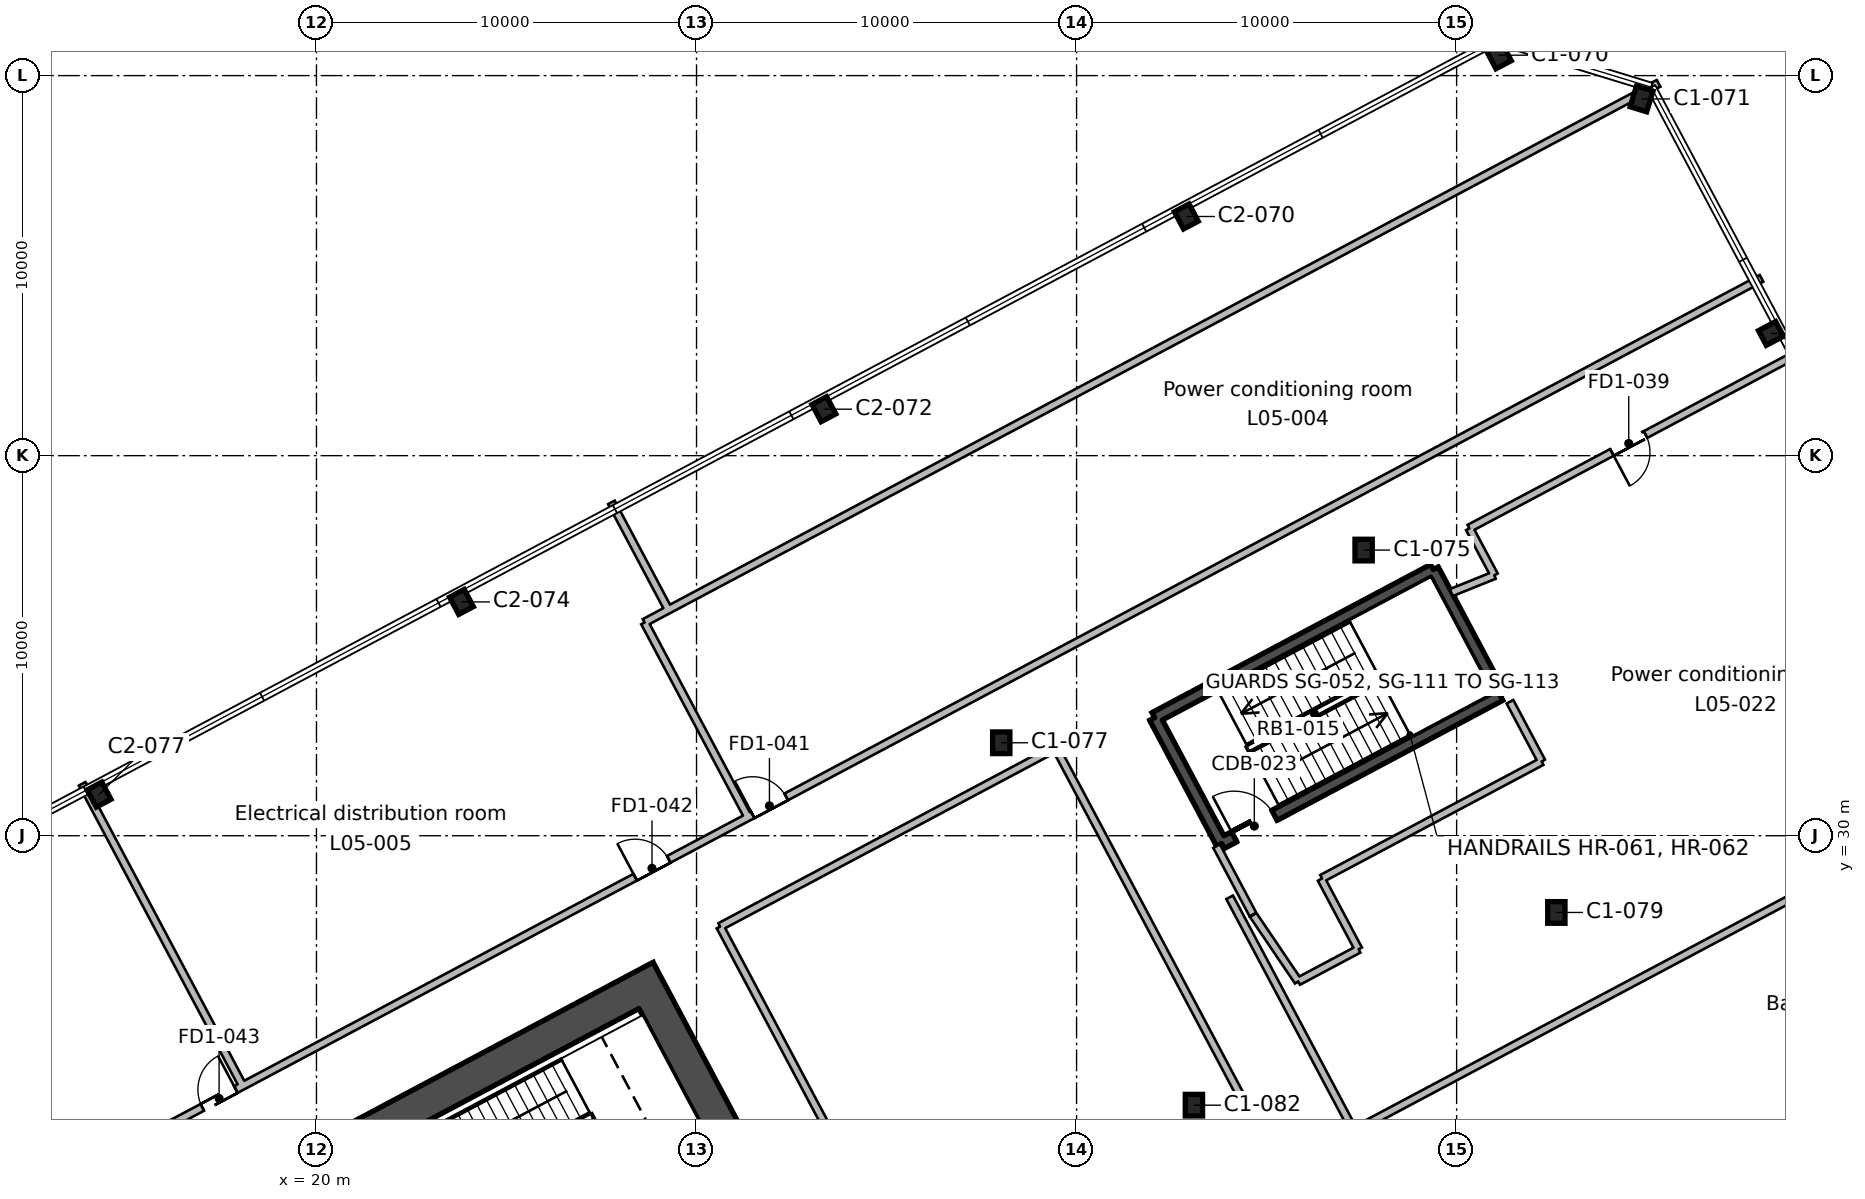
"""IFC4 building model, lengths in metres.
Left out: names, types, materials, properties, quantities, classifications, styles, units other than length and angle.
Written with IfcOpenShell. Run it as: python <this file> out.ifc"""

import sys

from ifc_helpers import new_model, si_unit, direction, frame, frame_2d, origin, origin_2d, place, context, subcontext, project, spatial, rectangle, i_section, extrude, element, fill, save


model = new_model("IFC4")
c1 = context("Model", 3, precision=1e-05, world=origin(), true_north=direction((0.0, 1.0)))
c2 = subcontext(c1, "Body", "Model", "MODEL_VIEW")
j1 = project(units=[si_unit("LENGTHUNIT", "METRE"), si_unit("PLANEANGLEUNIT", "RADIAN")], contexts=[c1])
p1 = place(None, origin())
s1 = spatial("IfcSite", under=j1, at=p1, CompositionType="ELEMENT")
p2 = place(p1, origin())
s2 = spatial("IfcBuilding", under=s1, at=p2, CompositionType="ELEMENT")
p3 = place(p2, frame((0.0, 0.0, 28.4)))
s3 = spatial("IfcBuildingStorey", under=s2, at=p3, CompositionType="ELEMENT", Elevation=28.4)
for number, where, z_axis, x_axis in (
    (1, (43.088, 22.91, 0.0), (0.0, 0.0, 1.0), (1.0, 0.0, 0.0)),
    (2, (52.624, 27.981, 0.0), (0.0, 0.0, 1.0), (1.0, 0.0, 0.0)),
):
    element("IfcColumn", number, at=place(p3, frame(where, z_axis=z_axis, x_axis=x_axis)), inside=s3, PredefinedType="COLUMN", context=c2, shape_type="SweptSolid", body=[
        extrude(i_section(OverallWidth=0.455, OverallDepth=0.569, WebThickness=0.078, FlangeThickness=0.125, FilletRadius=0.015, at=origin_2d()), origin(), (0.0, 0.0, 1.0), 5.4),
    ])
p4 = place(p3, frame((14.279, 31.082, 0.0), z_axis=(0.0, 0.0, 1.0), x_axis=(-0.882947592859, -0.469471562786, 0.0)))
e3 = element("IfcColumn", 3, at=p4, inside=s3, PredefinedType="COLUMN", context=c2, shape_type="SweptSolid", body=[
    extrude(i_section(OverallWidth=0.437, OverallDepth=0.513, WebThickness=0.061, FlangeThickness=0.097, FilletRadius=0.015, at=origin_2d()), origin(), (0.0, 0.0, 1.0), 5.4),
])
p5 = place(p3, frame((38.018, 32.446, 0.0), z_axis=(0.0, 0.0, 1.0), x_axis=(1.0, 0.0, 0.0)))
e4 = element("IfcColumn", 4, at=p5, inside=s3, PredefinedType="COLUMN", context=c2, shape_type="SweptSolid", body=[
    extrude(i_section(OverallWidth=0.455, OverallDepth=0.569, WebThickness=0.078, FlangeThickness=0.125, FilletRadius=0.015, at=origin_2d()), origin(), (0.0, 0.0, 1.0), 5.4),
])
p6 = place(p3, frame((23.815, 36.152, 0.0), z_axis=(0.0, 0.0, 1.0), x_axis=(-0.882947592859, -0.469471562786, 0.0)))
e5 = element("IfcColumn", 5, at=p6, inside=s3, PredefinedType="COLUMN", context=c2, shape_type="SweptSolid", body=[
    extrude(i_section(OverallWidth=0.437, OverallDepth=0.513, WebThickness=0.061, FlangeThickness=0.097, FilletRadius=0.015, at=origin_2d()), origin(), (0.0, 0.0, 1.0), 5.4),
])
p7 = place(p3, frame((47.553, 37.516, 0.0), z_axis=(0.0, 0.0, 1.0), x_axis=(1.0, 0.0, 0.0)))
e6 = element("IfcColumn", 6, at=p7, inside=s3, PredefinedType="COLUMN", context=c2, shape_type="SweptSolid", body=[
    extrude(i_section(OverallWidth=0.455, OverallDepth=0.569, WebThickness=0.078, FlangeThickness=0.125, FilletRadius=0.015, at=origin_2d()), origin(), (0.0, 0.0, 1.0), 5.4),
])
for number, where, z_axis, x_axis in (
    (7, (33.351, 41.223, 0.0), (0.0, 0.0, 1.0), (-0.883, -0.469, 0.0)),
    (8, (58.272, 43.216, 0.0), (0.0, 0.0, 1.0), (-0.469, 0.883, 0.0)),
    (9, (42.887, 46.293, 0.0), (0.0, 0.0, 1.0), (-0.883, -0.469, 0.0)),
):
    element("IfcColumn", number, at=place(p3, frame(where, z_axis=z_axis, x_axis=x_axis)), inside=s3, PredefinedType="COLUMN", context=c2, shape_type="SweptSolid", body=[
        extrude(i_section(OverallWidth=0.437, OverallDepth=0.513, WebThickness=0.061, FlangeThickness=0.097, FilletRadius=0.015, at=origin_2d()), origin(), (0.0, 0.0, 1.0), 5.4),
    ])
for number, where, z_axis, x_axis in (
    (10, (54.867, 49.386, 0.0), (0.0, 0.0, 1.0), (-0.956, 0.292, 0.0)),
    (11, (51.103, 50.537, 0.0), (0.0, 0.0, 1.0), (-0.883, -0.469, 0.0)),
):
    element("IfcColumn", number, at=place(p3, frame(where, z_axis=z_axis, x_axis=x_axis)), inside=s3, PredefinedType="COLUMN", context=c2, shape_type="SweptSolid", body=[
        extrude(i_section(OverallWidth=0.455, OverallDepth=0.569, WebThickness=0.078, FlangeThickness=0.125, FilletRadius=0.015, at=origin_2d()), origin(), (0.0, 0.0, 1.0), 5.4),
    ])
p8 = place(p3, frame((37.849, 8.799, 0.0), z_axis=(0.0, 0.0, 1.0), x_axis=(-0.469465789982, 0.882950662289, 0.0)))
e12 = element("IfcWall", 12, at=p8, inside=s3, PredefinedType="SHEAR", context=c2, shape_type="SweptSolid", body=[
    extrude(rectangle(XDim=20.0, YDim=0.9, at=frame_2d((10.0, 0.0))), origin(), (0.0, 0.0, 1.0), 5.4),
])
p9 = place(p8, frame((10.6, 0.0, 0.0)))
e13 = element("IfcOpeningElement", 13, at=p9, cuts=e12, PredefinedType="OPENING", context=c2, shape_type="SweptSolid", body=[
    extrude(rectangle(XDim=2.4, YDim=2.4, at=frame_2d((1.2, 1.2))), frame((0.0, 0.46, 0.0), z_axis=(0.0, -1.0, 0.0), x_axis=(1.0, 0.0, 0.0)), (0.0, 0.0, 1.0), 0.92),
])
p10 = place(p3, frame((10.438, 16.366, 0.0), z_axis=(0.0, 0.0, 1.0), x_axis=(0.88294509198, 0.469476266226, 0.0)))
e14 = element("IfcWall", 14, at=p10, inside=s3, PredefinedType="SHEAR", context=c2, shape_type="SweptSolid", body=[
    extrude(rectangle(XDim=20.2, YDim=0.9, at=frame_2d((10.1, 0.0))), origin(), (0.0, 0.0, 1.0), 5.4),
])
p11 = place(p3, frame((49.384, 37.004, 0.0), z_axis=(0.0, 0.0, 1.0), x_axis=(0.46946936446, -0.882948761726, 0.0)))
e15 = element("IfcWall", 15, at=p11, inside=s3, PredefinedType="SHEAR", context=c2, shape_type="SweptSolid", body=[
    extrude(rectangle(XDim=3.75, YDim=0.3, at=frame_2d((1.875, 0.0))), origin(), (0.0, 0.0, 1.0), 5.4),
])
p12 = place(p3, frame((51.145, 33.693, 0.0), z_axis=(0.0, 0.0, 1.0), x_axis=(-0.882945809314, -0.469474917132, 0.0)))
e16 = element("IfcWall", 16, at=p12, inside=s3, PredefinedType="SHEAR", context=c2, shape_type="SweptSolid", body=[
    extrude(rectangle(XDim=8.3, YDim=0.3, at=frame_2d((4.15, 0.0))), origin(), (0.0, 0.0, 1.0), 5.4),
])
p13 = place(p12, frame((6.725, 0.0, 0.0)))
e17 = element("IfcOpeningElement", 17, at=p13, cuts=e16, PredefinedType="OPENING", context=c2, shape_type="SweptSolid", body=[
    extrude(rectangle(XDim=1.2, YDim=2.1, at=frame_2d((0.6, 1.05))), frame((0.0, 0.16, 0.0), z_axis=(0.0, -1.0, 0.0), x_axis=(1.0, 0.0, 0.0)), (0.0, 0.0, 1.0), 0.32),
])
p14 = place(p3, frame((43.816, 29.796, 0.0), z_axis=(0.0, 0.0, 1.0), x_axis=(-0.46946936446, 0.882948761726, 0.0)))
e18 = element("IfcWall", 18, at=p14, inside=s3, PredefinedType="SHEAR", context=c2, shape_type="SweptSolid", body=[
    extrude(rectangle(XDim=3.75, YDim=0.3, at=frame_2d((1.875, 0.0))), origin(), (0.0, 0.0, 1.0), 5.4),
])
p15 = place(p3, frame((42.055, 33.107, 0.0), z_axis=(0.0, 0.0, 1.0), x_axis=(0.882945809314, 0.469474917132, 0.0)))
e19 = element("IfcWall", 19, at=p15, inside=s3, PredefinedType="SHEAR", context=c2, shape_type="SweptSolid", body=[
    extrude(rectangle(XDim=8.3, YDim=0.3, at=frame_2d((4.15, 0.0))), origin(), (0.0, 0.0, 1.0), 5.4),
])
p16 = place(p3, frame((0.0, 13.815, 0.0), z_axis=(0.0, 0.0, 1.0), x_axis=(0.882946053005, 0.469474458819, 0.0)))
e20 = element("IfcWall", 20, at=p16, inside=s3, PredefinedType="PARTITIONING", context=c2, shape_type="SweptSolid", body=[
    extrude(rectangle(XDim=65.714, YDim=0.2, at=frame_2d((32.857, 0.0))), origin(), (0.0, 0.0, 1.0), 4.95),
])
p17 = place(p16, frame((35.65, 0.0, 0.0)))
e21 = element("IfcOpeningElement", 21, at=p17, cuts=e20, PredefinedType="OPENING", context=c2, shape_type="SweptSolid", body=[
    extrude(rectangle(XDim=1.0, YDim=2.1, at=frame_2d((0.5, 1.05))), frame((0.0, 0.11, 0.0), z_axis=(0.0, -1.0, 0.0), x_axis=(1.0, 0.0, 0.0)), (0.0, 0.0, 1.0), 0.22),
])
p18 = place(p16, frame((32.15, 0.0, 0.0)))
e22 = element("IfcOpeningElement", 22, at=p18, cuts=e20, PredefinedType="OPENING", context=c2, shape_type="SweptSolid", body=[
    extrude(rectangle(XDim=1.0, YDim=2.1, at=frame_2d((0.5, 1.05))), frame((0.0, 0.11, 0.0), z_axis=(0.0, -1.0, 0.0), x_axis=(1.0, 0.0, 0.0)), (0.0, 0.0, 1.0), 0.22),
])
p19 = place(p16, frame((19.25, 0.0, 0.0)))
e23 = element("IfcOpeningElement", 23, at=p19, cuts=e20, PredefinedType="OPENING", context=c2, shape_type="SweptSolid", body=[
    extrude(rectangle(XDim=1.0, YDim=2.1, at=frame_2d((0.5, 1.05))), frame((0.0, 0.11, 0.0), z_axis=(0.0, -1.0, 0.0), x_axis=(1.0, 0.0, 0.0)), (0.0, 0.0, 1.0), 0.22),
])
p20 = place(p3, frame((13.834, 31.366, 0.0), z_axis=(0.0, 0.0, 1.0), x_axis=(0.46934623538, -0.883014219214, 0.0)))
e24 = element("IfcWall", 24, at=p20, inside=s3, PredefinedType="PARTITIONING", context=c2, shape_type="SweptSolid", body=[
    extrude(rectangle(XDim=9.002, YDim=0.2, at=frame_2d((4.501, 0.0))), origin(), (0.0, 0.0, 1.0), 4.95),
])
p21 = place(p3, frame((69.475, 23.126, 0.0), z_axis=(0.0, 0.0, 1.0), x_axis=(-0.882944287046, -0.469477780063, 0.0)))
e25 = element("IfcWall", 25, at=p21, inside=s3, PredefinedType="PARTITIONING", context=c2, shape_type="SweptSolid", body=[
    extrude(rectangle(XDim=63.285, YDim=0.2, at=frame_2d((31.643, 0.0))), origin(), (0.0, 0.0, 1.0), 4.95),
])
p22 = place(p21, frame((47.47, 0.0, 0.0)))
e26 = element("IfcOpeningElement", 26, at=p22, cuts=e25, PredefinedType="OPENING", context=c2, shape_type="SweptSolid", body=[
    extrude(rectangle(XDim=1.0, YDim=2.1, at=frame_2d((0.5, 1.05))), frame((0.0, 0.11, 0.0), z_axis=(0.0, -1.0, 0.0), x_axis=(1.0, 0.0, 0.0)), (0.0, 0.0, 1.0), 0.22),
])
p23 = place(p21, frame((31.271, 0.0, 0.0)))
e27 = element("IfcOpeningElement", 27, at=p23, cuts=e25, PredefinedType="OPENING", context=c2, shape_type="SweptSolid", body=[
    extrude(rectangle(XDim=1.0, YDim=2.1, at=frame_2d((0.5, 1.05))), frame((0.0, 0.11, 0.0), z_axis=(0.0, -1.0, 0.0), x_axis=(1.0, 0.0, 0.0)), (0.0, 0.0, 1.0), 0.22),
])
p24 = place(p21, frame((24.07, 0.0, 0.0)))
e28 = element("IfcOpeningElement", 28, at=p24, cuts=e25, PredefinedType="OPENING", context=c2, shape_type="SweptSolid", body=[
    extrude(rectangle(XDim=1.0, YDim=2.1, at=frame_2d((0.5, 1.05))), frame((0.0, 0.11, 0.0), z_axis=(0.0, -1.0, 0.0), x_axis=(1.0, 0.0, 0.0)), (0.0, 0.0, 1.0), 0.22),
])
p25 = place(p21, frame((11.071, 0.0, 0.0)))
e29 = element("IfcOpeningElement", 29, at=p25, cuts=e25, PredefinedType="OPENING", context=c2, shape_type="SweptSolid", body=[
    extrude(rectangle(XDim=1.0, YDim=2.1, at=frame_2d((0.5, 1.05))), frame((0.0, 0.11, 0.0), z_axis=(0.0, -1.0, 0.0), x_axis=(1.0, 0.0, 0.0)), (0.0, 0.0, 1.0), 0.22),
])
p26 = place(p3, frame((30.307, 32.462, 0.0), z_axis=(0.0, 0.0, 1.0), x_axis=(0.469652813312, -0.882851196379, 0.0)))
e30 = element("IfcWall", 30, at=p26, inside=s3, PredefinedType="PARTITIONING", context=c2, shape_type="SweptSolid", body=[
    extrude(rectangle(XDim=2.236, YDim=0.2, at=frame_2d((1.118, 0.0))), origin(), (0.0, 0.0, 1.0), 4.95),
])
p27 = place(p3, frame((27.76, 38.771, 0.0), z_axis=(0.0, 0.0, 1.0), x_axis=(0.469320691295, -0.883027796121, 0.0)))
e31 = element("IfcWall", 31, at=p27, inside=s3, PredefinedType="PARTITIONING", context=c2, shape_type="SweptSolid", body=[
    extrude(rectangle(XDim=3.2, YDim=0.2, at=frame_2d((1.6, 0.0))), origin(), (0.0, 0.0, 1.0), 4.95),
])
p28 = place(p3, frame((29.26, 35.945, 0.0), z_axis=(0.0, 0.0, 1.0), x_axis=(0.882955510648, 0.469456671288, 0.0)))
e32 = element("IfcWall", 32, at=p28, inside=s3, PredefinedType="PARTITIONING", context=c2, shape_type="SweptSolid", body=[
    extrude(rectangle(XDim=29.507, YDim=0.2, at=frame_2d((14.753, 0.0))), origin(), (0.0, 0.0, 1.0), 4.95),
])
p29 = place(p3, frame((30.307, 32.462, 0.0), z_axis=(0.0, 0.0, 1.0), x_axis=(-0.469337071246, 0.883019090141, 0.0)))
e33 = element("IfcWall", 33, at=p29, inside=s3, PredefinedType="PARTITIONING", context=c2, shape_type="SweptSolid", body=[
    extrude(rectangle(XDim=3.566, YDim=0.2, at=frame_2d((1.783, 0.0))), origin(), (0.0, 0.0, 1.0), 4.95),
])
p30 = place(p3, frame((28.633, 35.611, 0.0), z_axis=(0.0, 0.0, 1.0), x_axis=(0.882581167339, 0.470160061106, 0.0)))
e34 = element("IfcWall", 34, at=p30, inside=s3, PredefinedType="PARTITIONING", context=c2, shape_type="SweptSolid", body=[
    extrude(rectangle(XDim=0.71, YDim=0.2, at=frame_2d((0.355, 0.0))), origin(), (0.0, 0.0, 1.0), 4.95),
])
p31 = place(p3, frame((44.028, 28.38, 0.0), z_axis=(0.0, 0.0, 1.0), x_axis=(0.469474817112, -0.882945862495, 0.0)))
e35 = element("IfcWall", 35, at=p31, inside=s3, PredefinedType="PARTITIONING", context=c2, shape_type="SweptSolid", body=[
    extrude(rectangle(XDim=14.39, YDim=0.2, at=frame_2d((7.195, 0.0))), origin(), (0.0, 0.0, 1.0), 4.95),
])
p32 = place(p3, frame((50.784, 15.674, 0.0), z_axis=(0.0, 0.0, 1.0), x_axis=(0.882931064856, 0.469502646119, 0.0)))
e36 = element("IfcWall", 36, at=p32, inside=s3, PredefinedType="PARTITIONING", context=c2, shape_type="SweptSolid", body=[
    extrude(rectangle(XDim=20.002, YDim=0.2, at=frame_2d((10.001, 0.0))), origin(), (0.0, 0.0, 1.0), 4.95),
])
p33 = place(p32, frame((9.35, 0.0, 0.0)))
e37 = element("IfcOpeningElement", 37, at=p33, cuts=e36, PredefinedType="OPENING", context=c2, shape_type="SweptSolid", body=[
    extrude(rectangle(XDim=1.0, YDim=2.1, at=frame_2d((0.5, 1.05))), frame((0.0, 0.11, 0.0), z_axis=(0.0, -1.0, 0.0), x_axis=(1.0, 0.0, 0.0)), (0.0, 0.0, 1.0), 0.22),
])
p34 = place(p3, frame((64.956, 31.625, 0.0), z_axis=(0.0, 0.0, 1.0), x_axis=(-0.882962064064, -0.469444345396, 0.0)))
e38 = element("IfcWall", 38, at=p34, inside=s3, PredefinedType="PARTITIONING", context=c2, shape_type="SweptSolid", body=[
    extrude(rectangle(XDim=20.002, YDim=0.2, at=frame_2d((10.001, 0.0))), origin(), (0.0, 0.0, 1.0), 4.95),
])
p35 = place(p3, frame((44.641, 27.925, 0.0), z_axis=(0.0, 0.0, 1.0), x_axis=(-0.469289400299, 0.88304442627, 0.0)))
e39 = element("IfcWall", 39, at=p35, inside=s3, PredefinedType="PARTITIONING", context=c2, shape_type="SweptSolid", body=[
    extrude(rectangle(XDim=2.04, YDim=0.2, at=frame_2d((1.02, 0.0))), origin(), (0.0, 0.0, 1.0), 4.95),
])
p36 = place(p3, frame((46.436, 28.863, 0.0), z_axis=(0.0, 0.0, 1.0), x_axis=(0.469342548312, -0.883016178982, 0.0)))
e40 = element("IfcWall", 40, at=p36, inside=s3, PredefinedType="PARTITIONING", context=c2, shape_type="SweptSolid", body=[
    extrude(rectangle(XDim=2.096, YDim=0.2, at=frame_2d((1.048, 0.0))), origin(), (0.0, 0.0, 1.0), 4.95),
])
p37 = place(p3, frame((47.42, 27.012, 0.0), z_axis=(0.0, 0.0, 1.0), x_axis=(-0.882911879422, -0.469538723829, 0.0)))
e41 = element("IfcWall", 41, at=p37, inside=s3, PredefinedType="PARTITIONING", context=c2, shape_type="SweptSolid", body=[
    extrude(rectangle(XDim=1.8, YDim=0.2, at=frame_2d((0.9, 0.0))), origin(), (0.0, 0.0, 1.0), 4.95),
])
p38 = place(p3, frame((45.831, 26.167, 0.0), z_axis=(0.0, 0.0, 1.0), x_axis=(-0.560924797645, 0.827866759441, 0.0)))
e42 = element("IfcWall", 42, at=p38, inside=s3, PredefinedType="PARTITIONING", context=c2, shape_type="SweptSolid", body=[
    extrude(rectangle(XDim=2.113, YDim=0.2, at=frame_2d((1.056, 0.0))), origin(), (0.0, 0.0, 1.0), 4.95),
])
p39 = place(p3, frame((51.404, 33.525, 0.0), z_axis=(0.0, 0.0, 1.0), x_axis=(0.469078340822, -0.883156560396, 0.0)))
e43 = element("IfcWall", 43, at=p39, inside=s3, PredefinedType="PARTITIONING", context=c2, shape_type="SweptSolid", body=[
    extrude(rectangle(XDim=1.78, YDim=0.2, at=frame_2d((0.89, 0.0))), origin(), (0.0, 0.0, 1.0), 4.95),
])
p40 = place(p3, frame((52.239, 31.953, 0.0), z_axis=(0.0, 0.0, 1.0), x_axis=(-0.882908561856, -0.469544962065, 0.0)))
e44 = element("IfcWall", 44, at=p40, inside=s3, PredefinedType="PARTITIONING", context=c2, shape_type="SweptSolid", body=[
    extrude(rectangle(XDim=6.549, YDim=0.2, at=frame_2d((3.274, 0.0))), origin(), (0.0, 0.0, 1.0), 4.95),
])
p41 = place(p3, frame((49.859, 36.397, 0.0), z_axis=(0.0, 0.0, 1.0), x_axis=(0.927439235731, 0.373973881477, 0.0)))
e45 = element("IfcWall", 45, at=p41, inside=s3, PredefinedType="PARTITIONING", context=c2, shape_type="SweptSolid", body=[
    extrude(rectangle(XDim=1.221, YDim=0.2, at=frame_2d((0.611, 0.0))), origin(), (0.0, 0.0, 1.0), 4.95),
])
p42 = place(p3, frame((50.337, 38.087, 0.0), z_axis=(0.0, 0.0, 1.0), x_axis=(0.469436222784, -0.882966382564, 0.0)))
e46 = element("IfcWall", 46, at=p42, inside=s3, PredefinedType="PARTITIONING", context=c2, shape_type="SweptSolid", body=[
    extrude(rectangle(XDim=1.397, YDim=0.2, at=frame_2d((0.699, 0.0))), origin(), (0.0, 0.0, 1.0), 4.95),
])
p43 = place(p3, frame((50.335, 38.091, 0.0), z_axis=(0.0, 0.0, 1.0), x_axis=(0.882925167554, 0.46951373622, 0.0)))
e47 = element("IfcWall", 47, at=p43, inside=s3, PredefinedType="PARTITIONING", context=c2, shape_type="SweptSolid", body=[
    extrude(rectangle(XDim=9.874, YDim=0.2, at=frame_2d((4.937, 0.0))), origin(), (0.0, 0.0, 1.0), 4.95),
])
p44 = place(p43, frame((4.25, 0.0, 0.0)))
e48 = element("IfcOpeningElement", 48, at=p44, cuts=e47, PredefinedType="OPENING", context=c2, shape_type="SweptSolid", body=[
    extrude(rectangle(XDim=1.0, YDim=2.1, at=frame_2d((0.5, 1.05))), frame((0.0, 0.11, 0.0), z_axis=(0.0, -1.0, 0.0), x_axis=(1.0, 0.0, 0.0)), (0.0, 0.0, 1.0), 0.22),
])
p45 = place(p3, frame((30.62, 27.609, 0.0), z_axis=(0.0, 0.0, 1.0), x_axis=(0.882924481944, 0.469515025515, 0.0)))
e49 = element("IfcWall", 49, at=p45, inside=s3, PredefinedType="PARTITIONING", context=c2, shape_type="SweptSolid", body=[
    extrude(rectangle(XDim=10.004, YDim=0.2, at=frame_2d((5.002, 0.0))), origin(), (0.0, 0.0, 1.0), 4.95),
])
p46 = place(p3, frame((39.453, 32.306, 0.0), z_axis=(0.0, 0.0, 1.0), x_axis=(0.469494565876, -0.882935361514, 0.0)))
e50 = element("IfcWall", 50, at=p46, inside=s3, PredefinedType="PARTITIONING", context=c2, shape_type="SweptSolid", body=[
    extrude(rectangle(XDim=20.005, YDim=0.2, at=frame_2d((10.002, 0.0))), origin(), (0.0, 0.0, 1.0), 4.95),
])
p47 = place(p3, frame((40.012, 9.947, 0.0), z_axis=(0.0, 0.0, 1.0), x_axis=(-0.469505288447, 0.882929659781, 0.0)))
e51 = element("IfcWall", 51, at=p47, inside=s3, PredefinedType="PARTITIONING", context=c2, shape_type="SweptSolid", body=[
    extrude(rectangle(XDim=20.004, YDim=0.2, at=frame_2d((10.002, 0.0))), origin(), (0.0, 0.0, 1.0), 4.95),
])
p48 = place(p47, frame((9.55, 0.0, 0.0)))
e52 = element("IfcOpeningElement", 52, at=p48, cuts=e51, PredefinedType="OPENING", context=c2, shape_type="SweptSolid", body=[
    extrude(rectangle(XDim=1.0, YDim=2.1, at=frame_2d((0.5, 1.05))), frame((0.0, 0.11, 0.0), z_axis=(0.0, -1.0, 0.0), x_axis=(1.0, 0.0, 0.0)), (0.0, 0.0, 1.0), 0.22),
])
p49 = place(p13, frame((1.2, 0.0, 0.0), z_axis=(0.0, 0.0, 1.0), x_axis=(-1.0, 0.0, 0.0)))
e53 = element("IfcDoor", 53, at=p49, inside=s3, OperationType="SINGLE_SWING_LEFT", PredefinedType="DOOR", context=c2, shape_type="SweptSolid", body=[
    extrude(rectangle(XDim=1.2, YDim=2.1, at=frame_2d((0.6, 1.05))), frame((0.0, 0.025, 0.0), z_axis=(0.0, -1.0, 0.0), x_axis=(1.0, 0.0, 0.0)), (0.0, 0.0, 1.0), 0.05),
])
fill(e17, e53)
p50 = place(p17, origin())
e54 = element("IfcDoor", 54, at=p50, inside=s3, OperationType="SINGLE_SWING_LEFT", PredefinedType="DOOR", context=c2, shape_type="SweptSolid", body=[
    extrude(rectangle(XDim=1.0, YDim=2.1, at=frame_2d((0.5, 1.05))), frame((0.0, 0.025, 0.0), z_axis=(0.0, -1.0, 0.0), x_axis=(1.0, 0.0, 0.0)), (0.0, 0.0, 1.0), 0.05),
])
fill(e21, e54)
p51 = place(p18, origin())
e55 = element("IfcDoor", 55, at=p51, inside=s3, OperationType="SINGLE_SWING_LEFT", PredefinedType="DOOR", context=c2, shape_type="SweptSolid", body=[
    extrude(rectangle(XDim=1.0, YDim=2.1, at=frame_2d((0.5, 1.05))), frame((0.0, 0.025, 0.0), z_axis=(0.0, -1.0, 0.0), x_axis=(1.0, 0.0, 0.0)), (0.0, 0.0, 1.0), 0.05),
])
fill(e22, e55)
p52 = place(p19, origin())
e56 = element("IfcDoor", 56, at=p52, inside=s3, OperationType="SINGLE_SWING_RIGHT", PredefinedType="DOOR", context=c2, shape_type="SweptSolid", body=[
    extrude(rectangle(XDim=1.0, YDim=2.1, at=frame_2d((0.5, 1.05))), frame((0.0, 0.025, 0.0), z_axis=(0.0, -1.0, 0.0), x_axis=(1.0, 0.0, 0.0)), (0.0, 0.0, 1.0), 0.05),
])
fill(e23, e56)
p53 = place(p44, frame((1.0, 0.0, 0.0), z_axis=(0.0, 0.0, 1.0), x_axis=(-1.0, 0.0, 0.0)))
e57 = element("IfcDoor", 57, at=p53, inside=s3, OperationType="SINGLE_SWING_RIGHT", PredefinedType="DOOR", context=c2, shape_type="SweptSolid", body=[
    extrude(rectangle(XDim=1.0, YDim=2.1, at=frame_2d((0.5, 1.05))), frame((0.0, 0.025, 0.0), z_axis=(0.0, -1.0, 0.0), x_axis=(1.0, 0.0, 0.0)), (0.0, 0.0, 1.0), 0.05),
])
fill(e48, e57)
save(model, sys.argv[1])
